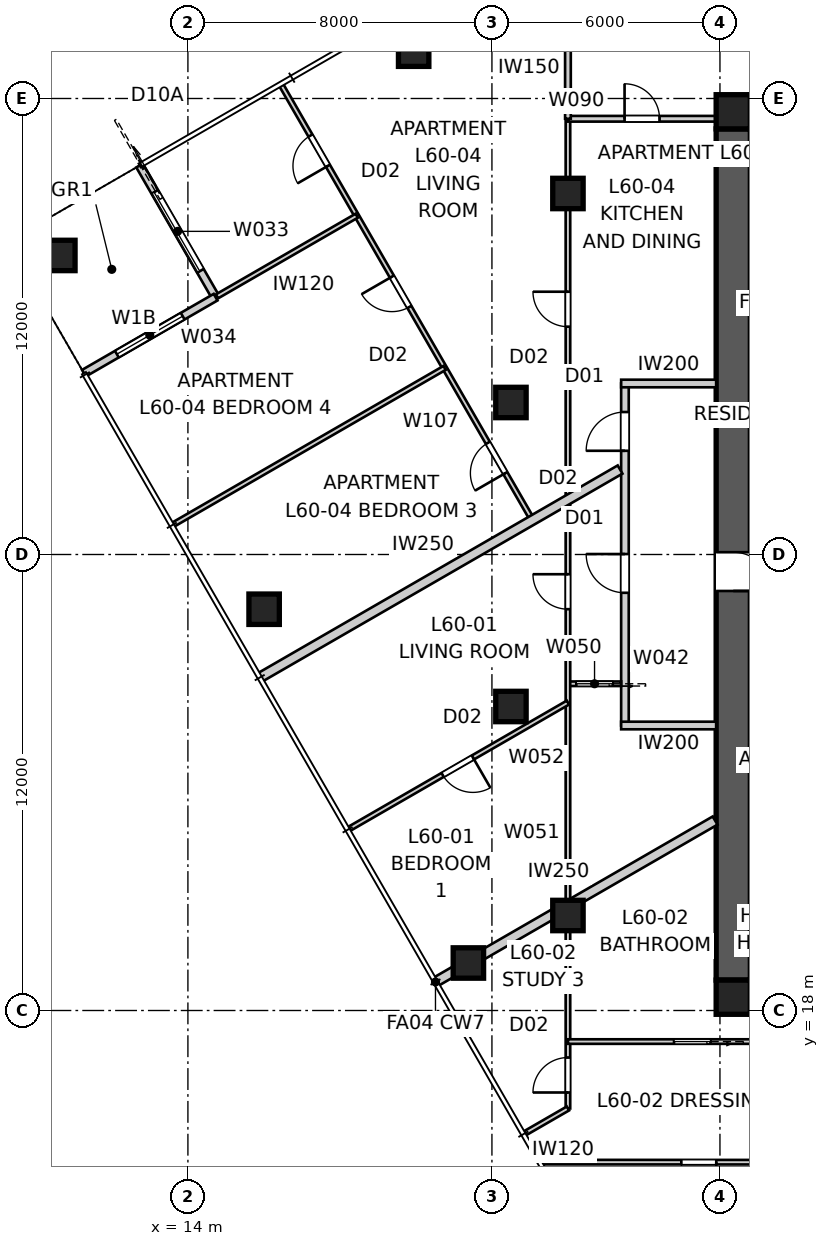
"""IFC4 building model, lengths in metres.
Left out: names, types, materials, properties, quantities, classifications, styles, units other than length and angle.
Written with IfcOpenShell. Run it as: python <this file> out.ifc"""

import sys

from ifc_helpers import new_model, si_unit, direction, frame, frame_2d, origin, origin_2d, place, context, subcontext, project, spatial, polyline, rectangle, outline, extrude, element, fill, save


model = new_model("IFC4")
c1 = context("Model", 3, precision=1e-05, world=origin(), true_north=direction((0.0, 1.0)))
c2 = subcontext(c1, "Body", "Model", "MODEL_VIEW")
j1 = project(units=[si_unit("LENGTHUNIT", "METRE"), si_unit("PLANEANGLEUNIT", "RADIAN")], contexts=[c1])
p1 = place(None, origin())
s1 = spatial("IfcSite", under=j1, at=p1, CompositionType="ELEMENT")
p2 = place(p1, origin())
s2 = spatial("IfcBuilding", under=s1, at=p2, CompositionType="ELEMENT")
p3 = place(p2, frame((0.0, 0.0, 218.4)))
s3 = spatial("IfcBuildingStorey", under=s2, at=p3, CompositionType="ELEMENT", Elevation=218.4)
for number, where, z_axis, x_axis in (
    (1, (28.8, 41.65, 0.0), (0.0, 0.0, 1.0), (1.0, 0.0, 0.0)),
    (2, (51.2, 18.35, 0.0), (0.0, 0.0, 1.0), (-1.0, 0.0, 0.0)),
):
    element("IfcWall", number, at=place(p3, frame(where, z_axis=z_axis, x_axis=x_axis)), inside=s3, PredefinedType="SHEAR", context=c2, shape_type="SweptSolid", body=[
        extrude(outline(polyline([(0.0, -0.45), (22.4, -0.45), (22.4, -0.025), (22.85, -0.025), (22.85, 0.025), (22.4, 0.025), (22.4, 0.45), (0.0, 0.45), (0.0, 0.025), (-0.45, 0.025), (-0.45, -0.025), (0.0, -0.025), (0.0, -0.45)])), origin(), (0.0, 0.0, 1.0), 3.4),
    ])
p4 = place(p3, frame((28.35, 41.2, 0.0), z_axis=(0.0, 0.0, 1.0), x_axis=(0.0, -1.0, 0.0)))
e3 = element("IfcWall", 3, at=p4, inside=s3, PredefinedType="SHEAR", context=c2, shape_type="SweptSolid", body=[
    extrude(outline(polyline([(0.0, -0.45), (22.4, -0.45), (22.4, -0.025), (22.85, -0.025), (22.85, 0.025), (22.4, 0.025), (22.4, 0.45), (0.0, 0.45), (0.0, 0.025), (-0.45, 0.025), (-0.45, -0.025), (0.0, -0.025), (0.0, -0.45)])), origin(), (0.0, 0.0, 1.0), 3.4),
])
p5 = place(p4, frame((11.14, 0.0, 0.0)))
e4 = element("IfcOpeningElement", 4, at=p5, cuts=e3, PredefinedType="OPENING", context=c2, shape_type="SweptSolid", body=[
    extrude(rectangle(XDim=1.02, YDim=2.4, at=frame_2d((0.51, 1.2))), frame((0.0, 0.46, 0.0), z_axis=(0.0, -1.0, 0.0), x_axis=(1.0, 0.0, 0.0)), (0.0, 0.0, 1.0), 0.92),
])
for number, where, z_axis, x_axis in (
    (5, (28.35, 18.35, 0.0), (0.0, 0.0, 1.0), (1.0, 0.0, 0.0)),
    (6, (28.35, 41.65, 0.0), (0.0, 0.0, 1.0), (1.0, 0.0, 0.0)),
):
    element("IfcColumn", number, at=place(p3, frame(where, z_axis=z_axis, x_axis=x_axis)), inside=s3, PredefinedType="COLUMN", context=c2, shape_type="SweptSolid", body=[
        extrude(rectangle(XDim=0.9, YDim=0.9, at=origin_2d()), origin(), (0.0, 0.0, 1.0), 3.4),
    ])
for number, where, z_axis, x_axis in (
    (7, (19.94, 43.245, 0.0), (0.0, 0.0, 1.0), (1.0, 0.0, 0.0)),
    (8, (10.63, 37.87, 0.0), (0.0, 0.0, 1.0), (1.0, 0.0, 0.0)),
    (9, (16.005, 28.56, 0.0), (0.0, 0.0, 1.0), (1.0, 0.0, 0.0)),
    (10, (21.38, 19.25, 0.0), (0.0, 0.0, 1.0), (1.0, 0.0, 0.0)),
    (11, (24.0, 39.5, 0.0), (0.0, 0.0, 1.0), (1.0, 0.0, 0.0)),
    (12, (22.5, 34.0, 0.0), (0.0, 0.0, 1.0), (1.0, 0.0, 0.0)),
    (13, (22.5, 26.0, 0.0), (0.0, 0.0, 1.0), (1.0, 0.0, 0.0)),
    (14, (24.0, 20.5, 0.0), (0.0, 0.0, 1.0), (1.0, 0.0, 0.0)),
):
    element("IfcColumn", number, at=place(p3, frame(where, z_axis=z_axis, x_axis=x_axis)), inside=s3, PredefinedType="COLUMN", context=c2, shape_type="SweptSolid", body=[
        extrude(rectangle(XDim=0.8, YDim=0.8, at=origin_2d()), origin(), (0.0, 0.0, 1.0), 3.4),
    ])
p6 = place(p3, frame((12.729, 40.236, 0.0), z_axis=(0.0, 0.0, 1.0), x_axis=(0.49999894854, -0.866026010844, 0.0)))
e15 = element("IfcWall", 15, at=p6, inside=s3, PredefinedType="SOLIDWALL", context=c2, shape_type="SweptSolid", body=[
    extrude(rectangle(XDim=4.0, YDim=0.2, at=frame_2d((2.0, 0.0))), origin(), (0.0, 0.0, 1.0), 3.25),
])
p7 = place(p6, frame((0.8, 0.0, 0.0)))
e16 = element("IfcOpeningElement", 16, at=p7, cuts=e15, PredefinedType="OPENING", context=c2, shape_type="SweptSolid", body=[
    extrude(rectangle(XDim=2.4, YDim=2.1, at=frame_2d((1.2, 1.05))), frame((0.0, 0.11, 0.0), z_axis=(0.0, -1.0, 0.0), x_axis=(1.0, 0.0, 0.0)), (0.0, 0.0, 1.0), 0.22),
])
p8 = place(p3, frame((14.729, 36.771, 0.0), z_axis=(0.0, 0.0, 1.0), x_axis=(-0.866026010844, -0.49999894854, 0.0)))
e17 = element("IfcWall", 17, at=p8, inside=s3, PredefinedType="SOLIDWALL", context=c2, shape_type="SweptSolid", body=[
    extrude(rectangle(XDim=4.0, YDim=0.2, at=frame_2d((2.0, 0.0))), origin(), (0.0, 0.0, 1.0), 3.25),
])
p9 = place(p8, frame((1.0, 0.0, 0.45)))
e18 = element("IfcOpeningElement", 18, at=p9, cuts=e17, PredefinedType="OPENING", context=c2, shape_type="SweptSolid", body=[
    extrude(rectangle(XDim=2.0, YDim=1.8, at=frame_2d((1.0, 0.9))), frame((0.0, 0.11, 0.0), z_axis=(0.0, -1.0, 0.0), x_axis=(1.0, 0.0, 0.0)), (0.0, 0.0, 1.0), 0.22),
])
p10 = place(p3, frame((25.5, 25.5, 0.0), z_axis=(0.0, 0.0, 1.0), x_axis=(0.0, 1.0, 0.0)))
e19 = element("IfcWall", 19, at=p10, inside=s3, PredefinedType="PARTITIONING", context=c2, shape_type="SweptSolid", body=[
    extrude(rectangle(XDim=9.0, YDim=0.2, at=frame_2d((4.5, 0.0))), origin(), (0.0, 0.0, 1.0), 3.25),
])
p11 = place(p10, frame((3.492, 0.0, 0.0)))
e20 = element("IfcOpeningElement", 20, at=p11, cuts=e19, PredefinedType="OPENING", context=c2, shape_type="SweptSolid", body=[
    extrude(rectangle(XDim=1.02, YDim=2.34, at=frame_2d((0.51, 1.17))), frame((0.0, 0.11, 0.0), z_axis=(0.0, -1.0, 0.0), x_axis=(1.0, 0.0, 0.0)), (0.0, 0.0, 1.0), 0.22),
])
p12 = place(p10, frame((7.229, 0.0, 0.0)))
e21 = element("IfcOpeningElement", 21, at=p12, cuts=e19, PredefinedType="OPENING", context=c2, shape_type="SweptSolid", body=[
    extrude(rectangle(XDim=1.02, YDim=2.34, at=frame_2d((0.51, 1.17))), frame((0.0, 0.11, 0.0), z_axis=(0.0, -1.0, 0.0), x_axis=(1.0, 0.0, 0.0)), (0.0, 0.0, 1.0), 0.22),
])
for number, where, z_axis, x_axis in (
    (22, (27.9, 34.5, 0.0), (0.0, 0.0, 1.0), (-1.0, 0.0, 0.0)),
    (23, (27.9, 25.5, 0.0), (0.0, 0.0, 1.0), (-1.0, 0.0, 0.0)),
):
    element("IfcWall", number, at=place(p3, frame(where, z_axis=z_axis, x_axis=x_axis)), inside=s3, PredefinedType="PARTITIONING", context=c2, shape_type="SweptSolid", body=[
        extrude(rectangle(XDim=2.5, YDim=0.2, at=frame_2d((1.25, 0.0))), origin(), (0.0, 0.0, 1.0), 3.25),
    ])
p13 = place(p3, frame((15.889, 26.761, 0.0), z_axis=(0.0, 0.0, 1.0), x_axis=(0.866024069551, 0.500002310952, 0.0)))
e24 = element("IfcWall", 24, at=p13, inside=s3, PredefinedType="PARTITIONING", context=c2, shape_type="SweptSolid", body=[
    extrude(rectangle(XDim=10.95, YDim=0.25, at=frame_2d((5.475, 0.0))), origin(), (0.0, 0.0, 1.0), 3.25),
])
p14 = place(p3, frame((20.514, 18.75, 0.0), z_axis=(0.0, 0.0, 1.0), x_axis=(0.866020489494, 0.500008511703, 0.0)))
e25 = element("IfcWall", 25, at=p14, inside=s3, PredefinedType="PARTITIONING", context=c2, shape_type="SweptSolid", body=[
    extrude(rectangle(XDim=8.496, YDim=0.25, at=frame_2d((4.248, 0.0))), origin(), (0.0, 0.0, 1.0), 3.25),
])
p15 = place(p3, frame((25.4, 26.598, 0.0), z_axis=(0.0, 0.0, 1.0), x_axis=(-1.0, 0.0, 0.0)))
e26 = element("IfcWall", 26, at=p15, inside=s3, PredefinedType="PARTITIONING", context=c2, shape_type="SweptSolid", body=[
    extrude(rectangle(XDim=1.4, YDim=0.12, at=frame_2d((0.7, 0.0))), origin(), (0.0, 0.0, 1.0), 3.25),
])
p16 = place(p15, frame((0.22, 0.0, 0.0)))
e27 = element("IfcOpeningElement", 27, at=p16, cuts=e26, PredefinedType="OPENING", context=c2, shape_type="SweptSolid", body=[
    extrude(rectangle(XDim=0.96, YDim=2.1, at=frame_2d((0.48, 1.05))), frame((0.0, 0.07, 0.0), z_axis=(0.0, -1.0, 0.0), x_axis=(1.0, 0.0, 0.0)), (0.0, 0.0, 1.0), 0.14),
])
p17 = place(p3, frame((24.0, 15.422, 0.0), z_axis=(0.0, 0.0, 1.0), x_axis=(0.0, 1.0, 0.0)))
e28 = element("IfcWall", 28, at=p17, inside=s3, PredefinedType="PARTITIONING", context=c2, shape_type="SweptSolid", body=[
    extrude(rectangle(XDim=26.045, YDim=0.12, at=frame_2d((13.022, 0.0))), origin(), (0.0, 0.0, 1.0), 2.55),
])
p18 = place(p17, frame((13.139, 0.0, 0.0)))
e29 = element("IfcOpeningElement", 29, at=p18, cuts=e28, PredefinedType="OPENING", context=c2, shape_type="SweptSolid", body=[
    extrude(rectangle(XDim=0.92, YDim=2.34, at=frame_2d((0.46, 1.17))), frame((0.0, 0.07, 0.0), z_axis=(0.0, -1.0, 0.0), x_axis=(1.0, 0.0, 0.0)), (0.0, 0.0, 1.0), 0.14),
])
p19 = place(p17, frame((20.573, 0.0, 0.0)))
e30 = element("IfcOpeningElement", 30, at=p19, cuts=e28, PredefinedType="OPENING", context=c2, shape_type="SweptSolid", body=[
    extrude(rectangle(XDim=0.92, YDim=2.34, at=frame_2d((0.46, 1.17))), frame((0.0, 0.07, 0.0), z_axis=(0.0, -1.0, 0.0), x_axis=(1.0, 0.0, 0.0)), (0.0, 0.0, 1.0), 0.14),
])
p20 = place(p17, frame((0.42, 0.0, 0.0)))
e31 = element("IfcOpeningElement", 31, at=p20, cuts=e28, PredefinedType="OPENING", context=c2, shape_type="SweptSolid", body=[
    extrude(rectangle(XDim=0.92, YDim=2.34, at=frame_2d((0.46, 1.17))), frame((0.0, 0.07, 0.0), z_axis=(0.0, -1.0, 0.0), x_axis=(1.0, 0.0, 0.0)), (0.0, 0.0, 1.0), 0.14),
])
p21 = place(p3, frame((24.0, 26.103, 0.0), z_axis=(0.0, 0.0, 1.0), x_axis=(-0.866017585169, -0.500013541994, 0.0)))
e32 = element("IfcWall", 32, at=p21, inside=s3, PredefinedType="PARTITIONING", context=c2, shape_type="SweptSolid", body=[
    extrude(rectangle(XDim=6.655, YDim=0.12, at=frame_2d((3.328, 0.0))), origin(), (0.0, 0.0, 1.0), 3.25),
])
p22 = place(p21, frame((2.887, 0.0, 0.0)))
e33 = element("IfcOpeningElement", 33, at=p22, cuts=e32, PredefinedType="OPENING", context=c2, shape_type="SweptSolid", body=[
    extrude(rectangle(XDim=0.92, YDim=2.34, at=frame_2d((0.46, 1.17))), frame((0.0, 0.07, 0.0), z_axis=(0.0, -1.0, 0.0), x_axis=(1.0, 0.0, 0.0)), (0.0, 0.0, 1.0), 0.14),
])
p23 = place(p3, frame((32.944, 17.183, 0.0), z_axis=(0.0, 0.0, 1.0), x_axis=(-1.0, 0.0, 0.0)))
e34 = element("IfcWall", 34, at=p23, inside=s3, PredefinedType="PARTITIONING", context=c2, shape_type="SweptSolid", body=[
    extrude(rectangle(XDim=8.944, YDim=0.12, at=frame_2d((4.472, 0.0))), origin(), (0.0, 0.0, 1.0), 3.25),
])
p24 = place(p23, frame((5.192, 0.0, 0.0)))
e35 = element("IfcOpeningElement", 35, at=p24, cuts=e34, PredefinedType="OPENING", context=c2, shape_type="SweptSolid", body=[
    extrude(rectangle(XDim=0.96, YDim=2.1, at=frame_2d((0.48, 1.05))), frame((0.0, 0.07, 0.0), z_axis=(0.0, -1.0, 0.0), x_axis=(1.0, 0.0, 0.0)), (0.0, 0.0, 1.0), 0.14),
])
p25 = place(p3, frame((51.757, 14.0, 0.0), z_axis=(0.0, 0.0, 1.0), x_axis=(-0.999999938148, 0.000351716958, 0.0)))
e36 = element("IfcWall", 36, at=p25, inside=s3, PredefinedType="PARTITIONING", context=c2, shape_type="SweptSolid", body=[
    extrude(rectangle(XDim=28.46, YDim=0.12, at=frame_2d((14.23, 0.0))), origin(), (0.0, 0.0, 1.0), 2.55),
])
p26 = place(p25, frame((3.82, 0.0, 0.0)))
e37 = element("IfcOpeningElement", 37, at=p26, cuts=e36, PredefinedType="OPENING", context=c2, shape_type="SweptSolid", body=[
    extrude(rectangle(XDim=0.92, YDim=2.34, at=frame_2d((0.46, 1.17))), frame((0.0, 0.07, 0.0), z_axis=(0.0, -1.0, 0.0), x_axis=(1.0, 0.0, 0.0)), (0.0, 0.0, 1.0), 0.14),
])
p27 = place(p25, frame((9.17, 0.0, 0.0)))
e38 = element("IfcOpeningElement", 38, at=p27, cuts=e36, PredefinedType="OPENING", context=c2, shape_type="SweptSolid", body=[
    extrude(rectangle(XDim=0.96, YDim=2.1, at=frame_2d((0.48, 1.05))), frame((0.0, 0.07, 0.0), z_axis=(0.0, -1.0, 0.0), x_axis=(1.0, 0.0, 0.0)), (0.0, 0.0, 1.0), 0.14),
])
p28 = place(p25, frame((13.68, 0.0, 0.0)))
e39 = element("IfcOpeningElement", 39, at=p28, cuts=e36, PredefinedType="OPENING", context=c2, shape_type="SweptSolid", body=[
    extrude(rectangle(XDim=0.96, YDim=2.1, at=frame_2d((0.48, 1.05))), frame((0.0, 0.07, 0.0), z_axis=(0.0, -1.0, 0.0), x_axis=(1.0, 0.0, 0.0)), (0.0, 0.0, 1.0), 0.14),
])
p29 = place(p25, frame((23.854, 0.0, 0.0)))
e40 = element("IfcOpeningElement", 40, at=p29, cuts=e36, PredefinedType="OPENING", context=c2, shape_type="SweptSolid", body=[
    extrude(rectangle(XDim=0.92, YDim=2.34, at=frame_2d((0.46, 1.17))), frame((0.0, 0.07, 0.0), z_axis=(0.0, -1.0, 0.0), x_axis=(1.0, 0.0, 0.0)), (0.0, 0.0, 1.0), 0.14),
])
p30 = place(p3, frame((22.862, 14.765, 0.0), z_axis=(0.0, 0.0, 1.0), x_axis=(0.866040225545, 0.499974327079, 0.0)))
e41 = element("IfcWall", 41, at=p30, inside=s3, PredefinedType="PARTITIONING", context=c2, shape_type="SweptSolid", body=[
    extrude(rectangle(XDim=1.314, YDim=0.12, at=frame_2d((0.657, 0.0))), origin(), (0.0, 0.0, 1.0), 3.25),
])
p31 = place(p3, frame((25.174, 10.759, 0.0), z_axis=(0.0, 0.0, 1.0), x_axis=(0.866023120914, 0.500003954026, 0.0)))
e42 = element("IfcWall", 42, at=p31, inside=s3, PredefinedType="PARTITIONING", context=c2, shape_type="SweptSolid", body=[
    extrude(rectangle(XDim=6.481, YDim=0.12, at=frame_2d((3.241, 0.0))), origin(), (0.0, 0.0, 1.0), 3.25),
])
p32 = place(p3, frame((24.0, 41.467, 0.0), z_axis=(0.0, 0.0, 1.0), x_axis=(1.0, 0.0, 0.0)))
e43 = element("IfcWall", 43, at=p32, inside=s3, PredefinedType="SOLIDWALL", context=c2, shape_type="SweptSolid", body=[
    extrude(rectangle(XDim=4.82, YDim=0.15, at=frame_2d((2.41, 0.0))), origin(), (0.0, 0.0, 1.0), 3.25),
])
p33 = place(p32, frame((1.49, 0.0, 0.0)))
e44 = element("IfcOpeningElement", 44, at=p33, cuts=e43, PredefinedType="OPENING", context=c2, shape_type="SweptSolid", body=[
    extrude(rectangle(XDim=0.92, YDim=2.1, at=frame_2d((0.46, 1.05))), frame((0.0, 0.085, 0.0), z_axis=(0.0, -1.0, 0.0), x_axis=(1.0, 0.0, 0.0)), (0.0, 0.0, 1.0), 0.17),
])
p34 = place(p3, frame((23.067, 30.905, 0.0), z_axis=(0.0, 0.0, 1.0), x_axis=(-0.499999220117, 0.86602585405, 0.0)))
e45 = element("IfcWall", 45, at=p34, inside=s3, PredefinedType="PARTITIONING", context=c2, shape_type="SweptSolid", body=[
    extrude(rectangle(XDim=13.21, YDim=0.12, at=frame_2d((6.605, 0.0))), origin(), (0.0, 0.0, 1.0), 3.25),
])
p35 = place(p34, frame((6.478, 0.0, 0.0)))
e46 = element("IfcOpeningElement", 46, at=p35, cuts=e45, PredefinedType="OPENING", context=c2, shape_type="SweptSolid", body=[
    extrude(rectangle(XDim=0.92, YDim=2.34, at=frame_2d((0.46, 1.17))), frame((0.0, 0.07, 0.0), z_axis=(0.0, -1.0, 0.0), x_axis=(1.0, 0.0, 0.0)), (0.0, 0.0, 1.0), 0.14),
])
p36 = place(p34, frame((1.427, 0.0, 0.0)))
e47 = element("IfcOpeningElement", 47, at=p36, cuts=e45, PredefinedType="OPENING", context=c2, shape_type="SweptSolid", body=[
    extrude(rectangle(XDim=0.92, YDim=2.34, at=frame_2d((0.46, 1.17))), frame((0.0, 0.07, 0.0), z_axis=(0.0, -1.0, 0.0), x_axis=(1.0, 0.0, 0.0)), (0.0, 0.0, 1.0), 0.14),
])
p37 = place(p34, frame((10.765, 0.0, 0.0)))
e48 = element("IfcOpeningElement", 48, at=p37, cuts=e45, PredefinedType="OPENING", context=c2, shape_type="SweptSolid", body=[
    extrude(rectangle(XDim=0.92, YDim=2.34, at=frame_2d((0.46, 1.17))), frame((0.0, 0.07, 0.0), z_axis=(0.0, -1.0, 0.0), x_axis=(1.0, 0.0, 0.0)), (0.0, 0.0, 1.0), 0.14),
])
p38 = place(p3, frame((24.0, 44.115, 0.0), z_axis=(0.0, 0.0, 1.0), x_axis=(0.0, -1.0, 0.0)))
e49 = element("IfcWall", 49, at=p38, inside=s3, PredefinedType="SOLIDWALL", context=c2, shape_type="SweptSolid", body=[
    extrude(rectangle(XDim=2.648, YDim=0.15, at=frame_2d((1.324, 0.0))), origin(), (0.0, 0.0, 1.0), 3.25),
])
p39 = place(p3, frame((13.612, 30.786, 0.0), z_axis=(0.0, 0.0, 1.0), x_axis=(0.866032284491, 0.499988082077, 0.0)))
e50 = element("IfcWall", 50, at=p39, inside=s3, PredefinedType="PARTITIONING", context=c2, shape_type="SweptSolid", body=[
    extrude(rectangle(XDim=8.248, YDim=0.12, at=frame_2d((4.124, 0.0))), origin(), (0.0, 0.0, 1.0), 3.25),
])
p40 = place(p3, frame((14.763, 36.792, 0.0), z_axis=(0.0, 0.0, 1.0), x_axis=(0.86603819212, 0.4999778493, 0.0)))
e51 = element("IfcWall", 51, at=p40, inside=s3, PredefinedType="PARTITIONING", context=c2, shape_type="SweptSolid", body=[
    extrude(rectangle(XDim=4.248, YDim=0.12, at=frame_2d((2.124, 0.0))), origin(), (0.0, 0.0, 1.0), 3.25),
])
p41 = place(p7, origin())
e52 = element("IfcDoor", 52, at=p41, inside=s3, OperationType="SLIDING_TO_LEFT", PredefinedType="DOOR", context=c2, shape_type="SweptSolid", body=[
    extrude(rectangle(XDim=2.4, YDim=2.1, at=frame_2d((1.2, 1.05))), frame((0.0, 0.025, 0.0), z_axis=(0.0, -1.0, 0.0), x_axis=(1.0, 0.0, 0.0)), (0.0, 0.0, 1.0), 0.05),
])
fill(e16, e52)
p42 = place(p9, origin())
e53 = element("IfcWindow", 53, at=p42, inside=s3, PartitioningType="SINGLE_PANEL", PredefinedType="WINDOW", context=c2, shape_type="SweptSolid", body=[
    extrude(rectangle(XDim=2.0, YDim=1.8, at=frame_2d((1.0, 0.9))), frame((0.0, 0.03, 0.0), z_axis=(0.0, -1.0, 0.0), x_axis=(1.0, 0.0, 0.0)), (0.0, 0.0, 1.0), 0.06),
])
fill(e18, e53)
p43 = place(p11, origin())
e54 = element("IfcDoor", 54, at=p43, inside=s3, OperationType="SINGLE_SWING_RIGHT", PredefinedType="DOOR", context=c2, shape_type="SweptSolid", body=[
    extrude(rectangle(XDim=1.02, YDim=2.34, at=frame_2d((0.51, 1.17))), frame((0.0, 0.025, 0.0), z_axis=(0.0, -1.0, 0.0), x_axis=(1.0, 0.0, 0.0)), (0.0, 0.0, 1.0), 0.05),
])
fill(e20, e54)
p44 = place(p12, origin())
e55 = element("IfcDoor", 55, at=p44, inside=s3, OperationType="SINGLE_SWING_LEFT", PredefinedType="DOOR", context=c2, shape_type="SweptSolid", body=[
    extrude(rectangle(XDim=1.02, YDim=2.34, at=frame_2d((0.51, 1.17))), frame((0.0, 0.025, 0.0), z_axis=(0.0, -1.0, 0.0), x_axis=(1.0, 0.0, 0.0)), (0.0, 0.0, 1.0), 0.05),
])
fill(e21, e55)
p45 = place(p18, origin())
e56 = element("IfcDoor", 56, at=p45, inside=s3, OperationType="SINGLE_SWING_RIGHT", PredefinedType="DOOR", context=c2, shape_type="SweptSolid", body=[
    extrude(rectangle(XDim=0.92, YDim=2.34, at=frame_2d((0.46, 1.17))), frame((0.0, 0.025, 0.0), z_axis=(0.0, -1.0, 0.0), x_axis=(1.0, 0.0, 0.0)), (0.0, 0.0, 1.0), 0.05),
])
fill(e29, e56)
p46 = place(p16, origin())
e57 = element("IfcDoor", 57, at=p46, inside=s3, OperationType="SLIDING_TO_LEFT", PredefinedType="DOOR", context=c2, shape_type="SweptSolid", body=[
    extrude(rectangle(XDim=0.96, YDim=2.1, at=frame_2d((0.48, 1.05))), frame((0.0, 0.025, 0.0), z_axis=(0.0, -1.0, 0.0), x_axis=(1.0, 0.0, 0.0)), (0.0, 0.0, 1.0), 0.05),
])
fill(e27, e57)
p47 = place(p19, origin())
e58 = element("IfcDoor", 58, at=p47, inside=s3, OperationType="SINGLE_SWING_RIGHT", PredefinedType="DOOR", context=c2, shape_type="SweptSolid", body=[
    extrude(rectangle(XDim=0.92, YDim=2.34, at=frame_2d((0.46, 1.17))), frame((0.0, 0.025, 0.0), z_axis=(0.0, -1.0, 0.0), x_axis=(1.0, 0.0, 0.0)), (0.0, 0.0, 1.0), 0.05),
])
fill(e30, e58)
p48 = place(p33, origin())
e59 = element("IfcDoor", 59, at=p48, inside=s3, OperationType="SINGLE_SWING_LEFT", PredefinedType="DOOR", context=c2, shape_type="SweptSolid", body=[
    extrude(rectangle(XDim=0.92, YDim=2.1, at=frame_2d((0.46, 1.05))), frame((0.0, 0.025, 0.0), z_axis=(0.0, -1.0, 0.0), x_axis=(1.0, 0.0, 0.0)), (0.0, 0.0, 1.0), 0.05),
])
fill(e44, e59)
p49 = place(p22, origin())
e60 = element("IfcDoor", 60, at=p49, inside=s3, OperationType="SINGLE_SWING_LEFT", PredefinedType="DOOR", context=c2, shape_type="SweptSolid", body=[
    extrude(rectangle(XDim=0.92, YDim=2.34, at=frame_2d((0.46, 1.17))), frame((0.0, 0.025, 0.0), z_axis=(0.0, -1.0, 0.0), x_axis=(1.0, 0.0, 0.0)), (0.0, 0.0, 1.0), 0.05),
])
fill(e33, e60)
p50 = place(p35, origin())
e61 = element("IfcDoor", 61, at=p50, inside=s3, OperationType="SINGLE_SWING_RIGHT", PredefinedType="DOOR", context=c2, shape_type="SweptSolid", body=[
    extrude(rectangle(XDim=0.92, YDim=2.34, at=frame_2d((0.46, 1.17))), frame((0.0, 0.025, 0.0), z_axis=(0.0, -1.0, 0.0), x_axis=(1.0, 0.0, 0.0)), (0.0, 0.0, 1.0), 0.05),
])
fill(e46, e61)
p51 = place(p36, origin())
e62 = element("IfcDoor", 62, at=p51, inside=s3, OperationType="SINGLE_SWING_LEFT", PredefinedType="DOOR", context=c2, shape_type="SweptSolid", body=[
    extrude(rectangle(XDim=0.92, YDim=2.34, at=frame_2d((0.46, 1.17))), frame((0.0, 0.025, 0.0), z_axis=(0.0, -1.0, 0.0), x_axis=(1.0, 0.0, 0.0)), (0.0, 0.0, 1.0), 0.05),
])
fill(e47, e62)
p52 = place(p37, origin())
e63 = element("IfcDoor", 63, at=p52, inside=s3, OperationType="SINGLE_SWING_LEFT", PredefinedType="DOOR", context=c2, shape_type="SweptSolid", body=[
    extrude(rectangle(XDim=0.92, YDim=2.34, at=frame_2d((0.46, 1.17))), frame((0.0, 0.025, 0.0), z_axis=(0.0, -1.0, 0.0), x_axis=(1.0, 0.0, 0.0)), (0.0, 0.0, 1.0), 0.05),
])
fill(e48, e63)
p53 = place(p24, origin())
e64 = element("IfcDoor", 64, at=p53, inside=s3, OperationType="SLIDING_TO_LEFT", PredefinedType="DOOR", context=c2, shape_type="SweptSolid", body=[
    extrude(rectangle(XDim=0.96, YDim=2.1, at=frame_2d((0.48, 1.05))), frame((0.0, 0.025, 0.0), z_axis=(0.0, -1.0, 0.0), x_axis=(1.0, 0.0, 0.0)), (0.0, 0.0, 1.0), 0.05),
])
fill(e35, e64)
p54 = place(p29, origin())
e65 = element("IfcDoor", 65, at=p54, inside=s3, OperationType="SINGLE_SWING_LEFT", PredefinedType="DOOR", context=c2, shape_type="SweptSolid", body=[
    extrude(rectangle(XDim=0.92, YDim=2.34, at=frame_2d((0.46, 1.17))), frame((0.0, 0.025, 0.0), z_axis=(0.0, -1.0, 0.0), x_axis=(1.0, 0.0, 0.0)), (0.0, 0.0, 1.0), 0.05),
])
fill(e40, e65)
p55 = place(p20, origin())
e66 = element("IfcDoor", 66, at=p55, inside=s3, OperationType="SINGLE_SWING_LEFT", PredefinedType="DOOR", context=c2, shape_type="SweptSolid", body=[
    extrude(rectangle(XDim=0.92, YDim=2.34, at=frame_2d((0.46, 1.17))), frame((0.0, 0.025, 0.0), z_axis=(0.0, -1.0, 0.0), x_axis=(1.0, 0.0, 0.0)), (0.0, 0.0, 1.0), 0.05),
])
fill(e31, e66)
p56 = place(p5, origin())
e67 = element("IfcDoor", 67, at=p56, inside=s3, OperationType="SINGLE_SWING_RIGHT", PredefinedType="DOOR", context=c2, shape_type="SweptSolid", body=[
    extrude(rectangle(XDim=1.02, YDim=2.4, at=frame_2d((0.51, 1.2))), frame((0.0, 0.025, 0.0), z_axis=(0.0, -1.0, 0.0), x_axis=(1.0, 0.0, 0.0)), (0.0, 0.0, 1.0), 0.05),
])
fill(e4, e67)
save(model, sys.argv[1])
